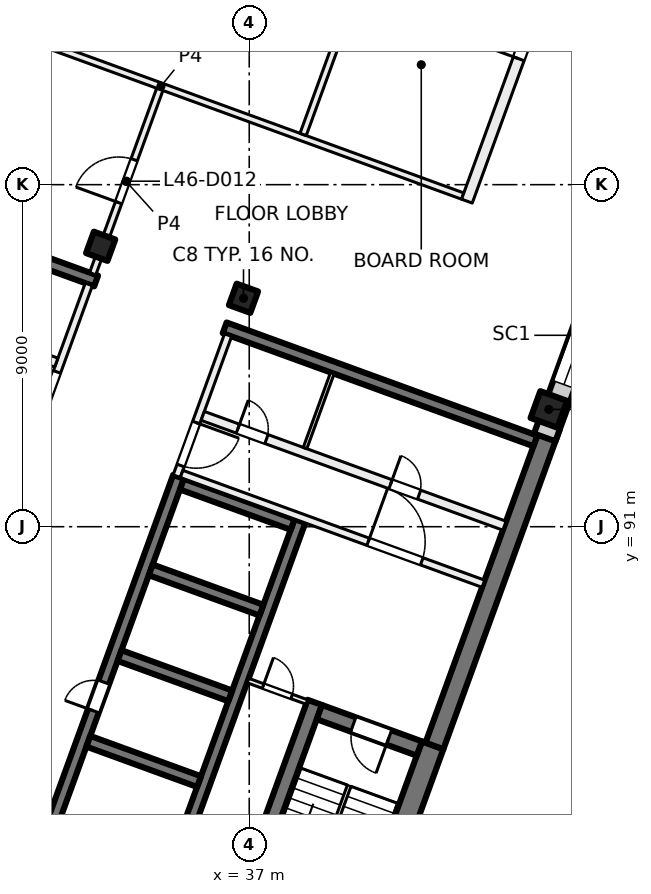
"""IFC4 building model, lengths in metres.
Left out: names, types, materials, properties, quantities, classifications, styles, units other than length and angle.
Written with IfcOpenShell. Run it as: python <this file> out.ifc"""

import sys

from ifc_helpers import new_model, si_unit, direction, frame, frame_2d, origin, origin_2d, place, context, subcontext, project, spatial, rectangle, extrude, element, fill, save


model = new_model("IFC4")
c1 = context("Model", 3, precision=1e-05, world=origin(), true_north=direction((0.0, 1.0)))
c2 = subcontext(c1, "Body", "Model", "MODEL_VIEW")
j1 = project(units=[si_unit("LENGTHUNIT", "METRE"), si_unit("PLANEANGLEUNIT", "RADIAN")], contexts=[c1])
p1 = place(None, origin())
s1 = spatial("IfcSite", under=j1, at=p1, CompositionType="ELEMENT")
p2 = place(p1, origin())
s2 = spatial("IfcBuilding", under=s1, at=p2, CompositionType="ELEMENT")
p3 = place(p2, frame((0.0, 0.0, 196.0)))
s3 = spatial("IfcBuildingStorey", under=s2, at=p3, CompositionType="ELEMENT", Elevation=196.0)
for number, where, z_axis, x_axis in (
    (1, (36.849, 97.011, 0.0), (0.0, 0.0, 1.0), (-0.342, -0.94, 0.0)),
    (2, (33.091, 98.379, 0.0), (0.0, 0.0, 1.0), (-0.342, -0.94, 0.0)),
):
    element("IfcColumn", number, at=place(p3, frame(where, z_axis=z_axis, x_axis=x_axis)), inside=s3, PredefinedType="COLUMN", context=c2, shape_type="SweptSolid", body=[
        extrude(rectangle(XDim=0.6, YDim=0.6, at=origin_2d()), origin(), (0.0, 0.0, 1.0), 4.0),
    ])
p4 = place(p3, frame((44.884, 94.087, 0.0), z_axis=(0.0, 0.0, 1.0), x_axis=(-0.342020143326, -0.939692620786, 0.0)))
e3 = element("IfcColumn", 3, at=p4, inside=s3, PredefinedType="COLUMN", context=c2, shape_type="SweptSolid", body=[
    extrude(rectangle(XDim=0.75, YDim=0.75, at=origin_2d()), origin(), (0.0, 0.0, 1.0), 4.0),
])
p5 = place(p3, frame((35.75, 78.788, 0.0), z_axis=(0.0, 0.0, 1.0), x_axis=(-0.939692894512, 0.342019391267, 0.0)))
e4 = element("IfcWall", 4, at=p5, inside=s3, PredefinedType="SHEAR", context=c2, shape_type="SweptSolid", body=[
    extrude(rectangle(XDim=14.4, YDim=0.5, at=frame_2d((7.2, 0.0))), origin(), (0.0, 0.0, 1.0), 4.0),
])
p6 = place(p3, frame((39.159, 77.92, 0.0), z_axis=(0.0, 0.0, 1.0), x_axis=(0.342016982193, 0.939693771338, 0.0)))
e5 = element("IfcWall", 5, at=p6, inside=s3, PredefinedType="SHEAR", context=c2, shape_type="SweptSolid", body=[
    extrude(rectangle(XDim=7.8, YDim=0.6, at=frame_2d((3.9, 0.0))), origin(), (0.0, 0.0, 1.0), 4.0),
])
p7 = place(p3, frame((41.874, 85.232, 0.0), z_axis=(0.0, 0.0, 1.0), x_axis=(0.342020437038, 0.939692513883, 0.0)))
e6 = element("IfcWall", 6, at=p7, inside=s3, PredefinedType="SHEAR", context=c2, shape_type="SweptSolid", body=[
    extrude(rectangle(XDim=8.975, YDim=0.5, at=frame_2d((4.487, 0.0))), origin(), (0.0, 0.0, 1.0), 4.0),
])
p8 = place(p3, frame((36.058, 79.048, 0.0), z_axis=(0.0, 0.0, 1.0), x_axis=(0.342016982193, 0.939693771338, 0.0)))
e7 = element("IfcWall", 7, at=p8, inside=s3, PredefinedType="SHEAR", context=c2, shape_type="SweptSolid", body=[
    extrude(rectangle(XDim=7.8, YDim=0.4, at=frame_2d((3.9, 0.0))), origin(), (0.0, 0.0, 1.0), 4.0),
])
p9 = place(p3, frame((41.476, 85.164, 0.0), z_axis=(0.0, 0.0, 1.0), x_axis=(-0.939678810556, 0.342058084236, 0.0)))
e8 = element("IfcWall", 8, at=p9, inside=s3, PredefinedType="SHEAR", context=c2, shape_type="SweptSolid", body=[
    extrude(rectangle(XDim=2.8, YDim=0.4, at=frame_2d((1.4, 0.0))), origin(), (0.0, 0.0, 1.0), 4.0),
])
p10 = place(p9, frame((0.85, 0.0, 0.0)))
e9 = element("IfcOpeningElement", 9, at=p10, cuts=e8, PredefinedType="OPENING", context=c2, shape_type="SweptSolid", body=[
    extrude(rectangle(XDim=1.0, YDim=2.1, at=frame_2d((0.5, 1.05))), frame((0.0, 0.21, 0.0), z_axis=(0.0, -1.0, 0.0), x_axis=(1.0, 0.0, 0.0)), (0.0, 0.0, 1.0), 0.42),
])
p11 = place(p3, frame((30.949, 80.801, 0.0), z_axis=(0.0, 0.0, 1.0), x_axis=(0.342016684409, 0.939693879721, 0.0)))
e10 = element("IfcWall", 10, at=p11, inside=s3, PredefinedType="SHEAR", context=c2, shape_type="SweptSolid", body=[
    extrude(rectangle(XDim=12.25, YDim=0.3, at=frame_2d((6.125, 0.0))), origin(), (0.0, 0.0, 1.0), 4.0),
])
p12 = place(p11, frame((0.9, 0.0, 0.0)))
e11 = element("IfcOpeningElement", 11, at=p12, cuts=e10, PredefinedType="OPENING", context=c2, shape_type="SweptSolid", body=[
    extrude(rectangle(XDim=0.8, YDim=2.1, at=frame_2d((0.4, 1.05))), frame((0.0, 0.16, 0.0), z_axis=(0.0, -1.0, 0.0), x_axis=(1.0, 0.0, 0.0)), (0.0, 0.0, 1.0), 0.32),
])
p13 = place(p11, frame((5.7, 0.0, 0.0)))
e12 = element("IfcOpeningElement", 12, at=p13, cuts=e10, PredefinedType="OPENING", context=c2, shape_type="SweptSolid", body=[
    extrude(rectangle(XDim=0.8, YDim=2.1, at=frame_2d((0.4, 1.05))), frame((0.0, 0.16, 0.0), z_axis=(0.0, -1.0, 0.0), x_axis=(1.0, 0.0, 0.0)), (0.0, 0.0, 1.0), 0.32),
])
p14 = place(p3, frame((34.144, 79.638, 0.0), z_axis=(0.0, 0.0, 1.0), x_axis=(0.342016684409, 0.939693879721, 0.0)))
e13 = element("IfcWall", 13, at=p14, inside=s3, PredefinedType="SHEAR", context=c2, shape_type="SweptSolid", body=[
    extrude(rectangle(XDim=12.25, YDim=0.3, at=frame_2d((6.125, 0.0))), origin(), (0.0, 0.0, 1.0), 4.0),
])
p15 = place(p3, frame((35.679, 84.294, 0.0), z_axis=(0.0, 0.0, 1.0), x_axis=(-0.939706007505, 0.341983361377, 0.0)))
e14 = element("IfcWall", 14, at=p15, inside=s3, PredefinedType="SHEAR", context=c2, shape_type="SweptSolid", body=[
    extrude(rectangle(XDim=3.1, YDim=0.3, at=frame_2d((1.55, 0.0))), origin(), (0.0, 0.0, 1.0), 4.0),
])
for number, where, z_axis, x_axis in (
    (15, (36.5, 86.549, 0.0), (0.0, 0.0, 1.0), (-0.94, 0.342, 0.0)),
    (16, (37.321, 88.805, 0.0), (0.0, 0.0, 1.0), (-0.94, 0.342, 0.0)),
    (17, (38.142, 91.06, 0.0), (0.0, 0.0, 1.0), (-0.94, 0.342, 0.0)),
):
    element("IfcWall", number, at=place(p3, frame(where, z_axis=z_axis, x_axis=x_axis)), inside=s3, PredefinedType="SHEAR", context=c2, shape_type="SweptSolid", body=[
        extrude(rectangle(XDim=3.1, YDim=0.3, at=frame_2d((1.55, 0.0))), origin(), (0.0, 0.0, 1.0), 4.0),
    ])
p16 = place(p3, frame((44.529, 93.258, 0.0), z_axis=(0.0, 0.0, 1.0), x_axis=(-0.9396917844, 0.342022441267, 0.0)))
e18 = element("IfcWall", 18, at=p16, inside=s3, PredefinedType="SHEAR", context=c2, shape_type="SweptSolid", body=[
    extrude(rectangle(XDim=8.7, YDim=0.3, at=frame_2d((4.35, 0.0))), origin(), (0.0, 0.0, 1.0), 4.0),
])
p17 = place(p3, frame((32.971, 97.465, 0.0), z_axis=(0.0, 0.0, 1.0), x_axis=(-0.939695066972, 0.34201342241, 0.0)))
e19 = element("IfcWall", 19, at=p17, inside=s3, PredefinedType="SHEAR", context=c2, shape_type="SweptSolid", body=[
    extrude(rectangle(XDim=8.7, YDim=0.3, at=frame_2d((4.35, 0.0))), origin(), (0.0, 0.0, 1.0), 4.0),
])
p18 = place(p3, frame((52.212, 113.783, 0.0), z_axis=(0.0, 0.0, 1.0), x_axis=(-0.34202521188, -0.939690775968, 0.0)))
e20 = element("IfcWall", 20, at=p18, inside=s3, PredefinedType="SOLIDWALL", context=c2, shape_type="SweptSolid", body=[
    extrude(rectangle(XDim=21.745, YDim=0.6, at=frame_2d((10.873, 0.0))), origin(), (0.0, 0.0, 1.0), 3.625),
])
p19 = place(p18, frame((3.765, 0.0, 0.9)))
e21 = element("IfcOpeningElement", 21, at=p19, cuts=e20, PredefinedType="OPENING", context=c2, shape_type="SweptSolid", body=[
    extrude(rectangle(XDim=3.0, YDim=2.4, at=frame_2d((1.5, 1.2))), frame((0.0, 0.31, 0.0), z_axis=(0.0, -1.0, 0.0), x_axis=(1.0, 0.0, 0.0)), (0.0, 0.0, 1.0), 0.62),
])
p20 = place(p18, frame((8.265, 0.0, 0.9)))
e22 = element("IfcOpeningElement", 22, at=p20, cuts=e20, PredefinedType="OPENING", context=c2, shape_type="SweptSolid", body=[
    extrude(rectangle(XDim=3.0, YDim=2.4, at=frame_2d((1.5, 1.2))), frame((0.0, 0.31, 0.0), z_axis=(0.0, -1.0, 0.0), x_axis=(1.0, 0.0, 0.0)), (0.0, 0.0, 1.0), 0.62),
])
p21 = place(p18, frame((12.765, 0.0, 0.9)))
e23 = element("IfcOpeningElement", 23, at=p21, cuts=e20, PredefinedType="OPENING", context=c2, shape_type="SweptSolid", body=[
    extrude(rectangle(XDim=3.0, YDim=2.4, at=frame_2d((1.5, 1.2))), frame((0.0, 0.31, 0.0), z_axis=(0.0, -1.0, 0.0), x_axis=(1.0, 0.0, 0.0)), (0.0, 0.0, 1.0), 0.62),
])
p22 = place(p18, frame((17.265, 0.0, 0.9)))
e24 = element("IfcOpeningElement", 24, at=p22, cuts=e20, PredefinedType="OPENING", context=c2, shape_type="SweptSolid", body=[
    extrude(rectangle(XDim=3.0, YDim=2.4, at=frame_2d((1.5, 1.2))), frame((0.0, 0.31, 0.0), z_axis=(0.0, -1.0, 0.0), x_axis=(1.0, 0.0, 0.0)), (0.0, 0.0, 1.0), 0.62),
])
p23 = place(p3, frame((24.666, 100.669, 0.0), z_axis=(0.0, 0.0, 1.0), x_axis=(0.34201964167, 0.939692803373, 0.0)))
e25 = element("IfcWall", 25, at=p23, inside=s3, PredefinedType="SOLIDWALL", context=c2, shape_type="SweptSolid", body=[
    extrude(rectangle(XDim=32.884, YDim=0.6, at=frame_2d((16.442, 0.0))), origin(), (0.0, 0.0, 1.0), 3.625),
])
p24 = place(p23, frame((1.48, 0.0, 0.9)))
e26 = element("IfcOpeningElement", 26, at=p24, cuts=e25, PredefinedType="OPENING", context=c2, shape_type="SweptSolid", body=[
    extrude(rectangle(XDim=3.0, YDim=2.4, at=frame_2d((1.5, 1.2))), frame((0.0, 0.31, 0.0), z_axis=(0.0, -1.0, 0.0), x_axis=(1.0, 0.0, 0.0)), (0.0, 0.0, 1.0), 0.62),
])
p25 = place(p23, frame((5.98, 0.0, 0.9)))
e27 = element("IfcOpeningElement", 27, at=p25, cuts=e25, PredefinedType="OPENING", context=c2, shape_type="SweptSolid", body=[
    extrude(rectangle(XDim=3.0, YDim=2.4, at=frame_2d((1.5, 1.2))), frame((0.0, 0.31, 0.0), z_axis=(0.0, -1.0, 0.0), x_axis=(1.0, 0.0, 0.0)), (0.0, 0.0, 1.0), 0.62),
])
p26 = place(p23, frame((10.48, 0.0, 0.9)))
e28 = element("IfcOpeningElement", 28, at=p26, cuts=e25, PredefinedType="OPENING", context=c2, shape_type="SweptSolid", body=[
    extrude(rectangle(XDim=3.0, YDim=2.4, at=frame_2d((1.5, 1.2))), frame((0.0, 0.31, 0.0), z_axis=(0.0, -1.0, 0.0), x_axis=(1.0, 0.0, 0.0)), (0.0, 0.0, 1.0), 0.62),
])
p27 = place(p23, frame((14.98, 0.0, 0.9)))
e29 = element("IfcOpeningElement", 29, at=p27, cuts=e25, PredefinedType="OPENING", context=c2, shape_type="SweptSolid", body=[
    extrude(rectangle(XDim=3.0, YDim=2.4, at=frame_2d((1.5, 1.2))), frame((0.0, 0.31, 0.0), z_axis=(0.0, -1.0, 0.0), x_axis=(1.0, 0.0, 0.0)), (0.0, 0.0, 1.0), 0.62),
])
p28 = place(p23, frame((19.48, 0.0, 0.9)))
e30 = element("IfcOpeningElement", 30, at=p28, cuts=e25, PredefinedType="OPENING", context=c2, shape_type="SweptSolid", body=[
    extrude(rectangle(XDim=3.0, YDim=2.4, at=frame_2d((1.5, 1.2))), frame((0.0, 0.31, 0.0), z_axis=(0.0, -1.0, 0.0), x_axis=(1.0, 0.0, 0.0)), (0.0, 0.0, 1.0), 0.62),
])
p29 = place(p23, frame((23.98, 0.0, 0.9)))
e31 = element("IfcOpeningElement", 31, at=p29, cuts=e25, PredefinedType="OPENING", context=c2, shape_type="SweptSolid", body=[
    extrude(rectangle(XDim=3.0, YDim=2.4, at=frame_2d((1.5, 1.2))), frame((0.0, 0.31, 0.0), z_axis=(0.0, -1.0, 0.0), x_axis=(1.0, 0.0, 0.0)), (0.0, 0.0, 1.0), 0.62),
])
p30 = place(p23, frame((28.48, 0.0, 0.9)))
e32 = element("IfcOpeningElement", 32, at=p30, cuts=e25, PredefinedType="OPENING", context=c2, shape_type="SweptSolid", body=[
    extrude(rectangle(XDim=3.0, YDim=2.4, at=frame_2d((1.5, 1.2))), frame((0.0, 0.31, 0.0), z_axis=(0.0, -1.0, 0.0), x_axis=(1.0, 0.0, 0.0)), (0.0, 0.0, 1.0), 0.62),
])
p31 = place(p3, frame((31.427, 93.663, 0.0), z_axis=(0.0, 0.0, 1.0), x_axis=(0.342030870568, 0.93968871632, 0.0)))
e33 = element("IfcWall", 33, at=p31, inside=s3, PredefinedType="PARTITIONING", context=c2, shape_type="SweptSolid", body=[
    extrude(rectangle(XDim=3.95, YDim=0.2, at=frame_2d((1.975, 0.0))), origin(), (0.0, 0.0, 1.0), 3.625),
])
p32 = place(p31, frame((0.3, 0.0, 0.0)))
e34 = element("IfcOpeningElement", 34, at=p32, cuts=e33, PredefinedType="OPENING", context=c2, shape_type="SweptSolid", body=[
    extrude(rectangle(XDim=1.2, YDim=2.1, at=frame_2d((0.6, 1.05))), frame((0.0, 0.11, 0.0), z_axis=(0.0, -1.0, 0.0), x_axis=(1.0, 0.0, 0.0)), (0.0, 0.0, 1.0), 0.22),
])
p33 = place(p3, frame((23.983, 98.208, 0.0), z_axis=(0.0, 0.0, 1.0), x_axis=(0.939699751196, -0.342000552051, 0.0)))
e35 = element("IfcWall", 35, at=p33, inside=s3, PredefinedType="PARTITIONING", context=c2, shape_type="SweptSolid", body=[
    extrude(rectangle(XDim=8.45, YDim=0.25, at=frame_2d((4.225, 0.0))), origin(), (0.0, 0.0, 1.0), 3.625),
])
p34 = place(p33, frame((3.825, 0.0, 0.0)))
e36 = element("IfcOpeningElement", 36, at=p34, cuts=e35, PredefinedType="OPENING", context=c2, shape_type="SweptSolid", body=[
    extrude(rectangle(XDim=0.8, YDim=2.1, at=frame_2d((0.4, 1.05))), frame((0.0, 0.135, 0.0), z_axis=(0.0, -1.0, 0.0), x_axis=(1.0, 0.0, 0.0)), (0.0, 0.0, 1.0), 0.27),
])
p35 = place(p3, frame((36.443, 96.041, 0.0), z_axis=(0.0, 0.0, 1.0), x_axis=(-0.341996156931, -0.939701350773, 0.0)))
e37 = element("IfcWall", 37, at=p35, inside=s3, PredefinedType="PARTITIONING", context=c2, shape_type="SweptSolid", body=[
    extrude(rectangle(XDim=3.95, YDim=0.2, at=frame_2d((1.975, 0.0))), origin(), (0.0, 0.0, 1.0), 3.625),
])
p36 = place(p35, frame((2.45, 0.0, 0.0)))
e38 = element("IfcOpeningElement", 38, at=p36, cuts=e37, PredefinedType="OPENING", context=c2, shape_type="SweptSolid", body=[
    extrude(rectangle(XDim=1.2, YDim=2.1, at=frame_2d((0.6, 1.05))), frame((0.0, 0.11, 0.0), z_axis=(0.0, -1.0, 0.0), x_axis=(1.0, 0.0, 0.0)), (0.0, 0.0, 1.0), 0.22),
])
p37 = place(p3, frame((35.22, 92.389, 0.0), z_axis=(0.0, 0.0, 1.0), x_axis=(0.939690465531, -0.342026064782, 0.0)))
e39 = element("IfcWall", 39, at=p37, inside=s3, PredefinedType="PARTITIONING", context=c2, shape_type="SweptSolid", body=[
    extrude(rectangle(XDim=8.45, YDim=0.2, at=frame_2d((4.225, 0.0))), origin(), (0.0, 0.0, 1.0), 3.625),
])
p38 = place(p37, frame((5.225, 0.0, 0.0)))
e40 = element("IfcOpeningElement", 40, at=p38, cuts=e39, PredefinedType="OPENING", context=c2, shape_type="SweptSolid", body=[
    extrude(rectangle(XDim=1.5, YDim=2.1, at=frame_2d((0.75, 1.05))), frame((0.0, 0.11, 0.0), z_axis=(0.0, -1.0, 0.0), x_axis=(1.0, 0.0, 0.0)), (0.0, 0.0, 1.0), 0.22),
])
p39 = place(p3, frame((35.776, 93.916, 0.0), z_axis=(0.0, 0.0, 1.0), x_axis=(0.939690465531, -0.342026064782, 0.0)))
e41 = element("IfcWall", 41, at=p39, inside=s3, PredefinedType="PARTITIONING", context=c2, shape_type="SweptSolid", body=[
    extrude(rectangle(XDim=8.45, YDim=0.25, at=frame_2d((4.225, 0.0))), origin(), (0.0, 0.0, 1.0), 3.625),
])
p40 = place(p39, frame((0.985, 0.0, 0.0)))
e42 = element("IfcOpeningElement", 42, at=p40, cuts=e41, PredefinedType="OPENING", context=c2, shape_type="SweptSolid", body=[
    extrude(rectangle(XDim=0.8, YDim=2.1, at=frame_2d((0.4, 1.05))), frame((0.0, 0.135, 0.0), z_axis=(0.0, -1.0, 0.0), x_axis=(1.0, 0.0, 0.0)), (0.0, 0.0, 1.0), 0.27),
])
p41 = place(p39, frame((5.26, 0.0, 0.0)))
e43 = element("IfcOpeningElement", 43, at=p41, cuts=e41, PredefinedType="OPENING", context=c2, shape_type="SweptSolid", body=[
    extrude(rectangle(XDim=0.8, YDim=2.1, at=frame_2d((0.4, 1.05))), frame((0.0, 0.135, 0.0), z_axis=(0.0, -1.0, 0.0), x_axis=(1.0, 0.0, 0.0)), (0.0, 0.0, 1.0), 0.27),
])
p42 = place(p3, frame((36.966, 86.952, 0.0), z_axis=(0.0, 0.0, 1.0), x_axis=(0.939672407396, -0.342075674051, 0.0)))
e44 = element("IfcWall", 44, at=p42, inside=s3, PredefinedType="PARTITIONING", context=c2, shape_type="SweptSolid", body=[
    extrude(rectangle(XDim=1.65, YDim=0.125, at=frame_2d((0.825, 0.0))), origin(), (0.0, 0.0, 1.0), 3.625),
])
p43 = place(p42, frame((0.425, 0.0, 0.0)))
e45 = element("IfcOpeningElement", 45, at=p43, cuts=e44, PredefinedType="OPENING", context=c2, shape_type="SweptSolid", body=[
    extrude(rectangle(XDim=0.8, YDim=2.1, at=frame_2d((0.4, 1.05))), frame((0.0, 0.073, 0.0), z_axis=(0.0, -1.0, 0.0), x_axis=(1.0, 0.0, 0.0)), (0.0, 0.0, 1.0), 0.145),
])
p44 = place(p3, frame((39.187, 95.042, 0.0), z_axis=(0.0, 0.0, 1.0), x_axis=(-0.342023078919, -0.939691552312, 0.0)))
e46 = element("IfcWall", 46, at=p44, inside=s3, PredefinedType="PARTITIONING", context=c2, shape_type="SweptSolid", body=[
    extrude(rectangle(XDim=2.1, YDim=0.1, at=frame_2d((1.05, 0.0))), origin(), (0.0, 0.0, 1.0), 3.625),
])
p45 = place(p3, frame((26.736, 105.48, 0.0), z_axis=(0.0, 0.0, 1.0), x_axis=(0.939695108427, -0.342013308511, 0.0)))
e47 = element("IfcWall", 47, at=p45, inside=s3, PredefinedType="PARTITIONING", context=c2, shape_type="SweptSolid", body=[
    extrude(rectangle(XDim=16.9, YDim=0.175, at=frame_2d((8.45, 0.0))), origin(), (0.0, 0.0, 1.0), 3.625),
])
p46 = place(p3, frame((32.881, 97.657, 0.0), z_axis=(0.0, 0.0, 1.0), x_axis=(0.342058204353, 0.939678766832, 0.0)))
e48 = element("IfcWall", 48, at=p46, inside=s3, PredefinedType="PARTITIONING", context=c2, shape_type="SweptSolid", body=[
    extrude(rectangle(XDim=5.163, YDim=0.175, at=frame_2d((2.581, 0.0))), origin(), (0.0, 0.0, 1.0), 3.625),
])
p47 = place(p46, frame((1.991, 0.0, 0.0)))
e49 = element("IfcOpeningElement", 49, at=p47, cuts=e48, PredefinedType="OPENING", context=c2, shape_type="SweptSolid", body=[
    extrude(rectangle(XDim=1.2, YDim=2.1, at=frame_2d((0.6, 1.05))), frame((0.0, 0.097, 0.0), z_axis=(0.0, -1.0, 0.0), x_axis=(1.0, 0.0, 0.0)), (0.0, 0.0, 1.0), 0.195),
])
p48 = place(p3, frame((38.418, 101.321, 0.0), z_axis=(0.0, 0.0, 1.0), x_axis=(0.342082778631, 0.939669821035, 0.0)))
e50 = element("IfcWall", 50, at=p48, inside=s3, PredefinedType="PARTITIONING", context=c2, shape_type="SweptSolid", body=[
    extrude(rectangle(XDim=9.001, YDim=0.175, at=frame_2d((4.5, 0.0))), origin(), (0.0, 0.0, 1.0), 3.625),
])
p49 = place(p3, frame((42.728, 99.567, 0.0), z_axis=(0.0, 0.0, 1.0), x_axis=(0.342015412648, 0.939694342598, 0.0)))
e51 = element("IfcWall", 51, at=p49, inside=s3, PredefinedType="PARTITIONING", context=c2, shape_type="SweptSolid", body=[
    extrude(rectangle(XDim=23.031, YDim=0.3, at=frame_2d((11.516, 0.0))), origin(), (0.0, 0.0, 1.0), 3.625),
])
p50 = place(p49, frame((3.987, 0.0, 0.0)))
e52 = element("IfcOpeningElement", 52, at=p50, cuts=e51, PredefinedType="OPENING", context=c2, shape_type="SweptSolid", body=[
    extrude(rectangle(XDim=1.2, YDim=2.1, at=frame_2d((0.6, 1.05))), frame((0.0, 0.16, 0.0), z_axis=(0.0, -1.0, 0.0), x_axis=(1.0, 0.0, 0.0)), (0.0, 0.0, 1.0), 0.32),
])
p51 = place(p49, frame((10.437, 0.0, 0.0)))
e53 = element("IfcOpeningElement", 53, at=p51, cuts=e51, PredefinedType="OPENING", context=c2, shape_type="SweptSolid", body=[
    extrude(rectangle(XDim=1.8, YDim=2.1, at=frame_2d((0.9, 1.05))), frame((0.0, 0.16, 0.0), z_axis=(0.0, -1.0, 0.0), x_axis=(1.0, 0.0, 0.0)), (0.0, 0.0, 1.0), 0.32),
])
p52 = place(p49, frame((14.687, 0.0, 0.0)))
e54 = element("IfcOpeningElement", 54, at=p52, cuts=e51, PredefinedType="OPENING", context=c2, shape_type="SweptSolid", body=[
    extrude(rectangle(XDim=0.8, YDim=2.1, at=frame_2d((0.4, 1.05))), frame((0.0, 0.16, 0.0), z_axis=(0.0, -1.0, 0.0), x_axis=(1.0, 0.0, 0.0)), (0.0, 0.0, 1.0), 0.32),
])
p53 = place(p22, origin())
e55 = element("IfcWindow", 55, at=p53, inside=s3, PartitioningType="SINGLE_PANEL", PredefinedType="WINDOW", context=c2, shape_type="SweptSolid", body=[
    extrude(rectangle(XDim=3.0, YDim=2.4, at=frame_2d((1.5, 1.2))), frame((0.0, 0.03, 0.0), z_axis=(0.0, -1.0, 0.0), x_axis=(1.0, 0.0, 0.0)), (0.0, 0.0, 1.0), 0.06),
])
fill(e24, e55)
p54 = place(p13, origin())
e56 = element("IfcDoor", 56, at=p54, inside=s3, OperationType="SINGLE_SWING_RIGHT", PredefinedType="DOOR", context=c2, shape_type="SweptSolid", body=[
    extrude(rectangle(XDim=0.8, YDim=2.1, at=frame_2d((0.4, 1.05))), frame((0.0, 0.025, 0.0), z_axis=(0.0, -1.0, 0.0), x_axis=(1.0, 0.0, 0.0)), (0.0, 0.0, 1.0), 0.05),
])
fill(e12, e56)
p55 = place(p32, origin())
e57 = element("IfcDoor", 57, at=p55, inside=s3, OperationType="DOUBLE_DOOR_SINGLE_SWING", PredefinedType="DOOR", context=c2, shape_type="SweptSolid", body=[
    extrude(rectangle(XDim=1.2, YDim=2.1, at=frame_2d((0.6, 1.05))), frame((0.0, 0.025, 0.0), z_axis=(0.0, -1.0, 0.0), x_axis=(1.0, 0.0, 0.0)), (0.0, 0.0, 1.0), 0.05),
])
fill(e34, e57)
p56 = place(p36, origin())
e58 = element("IfcDoor", 58, at=p56, inside=s3, OperationType="DOUBLE_DOOR_SINGLE_SWING", PredefinedType="DOOR", context=c2, shape_type="SweptSolid", body=[
    extrude(rectangle(XDim=1.2, YDim=2.1, at=frame_2d((0.6, 1.05))), frame((0.0, 0.025, 0.0), z_axis=(0.0, -1.0, 0.0), x_axis=(1.0, 0.0, 0.0)), (0.0, 0.0, 1.0), 0.05),
])
fill(e38, e58)
p57 = place(p38, origin())
e59 = element("IfcDoor", 59, at=p57, inside=s3, OperationType="DOUBLE_DOOR_SINGLE_SWING", PredefinedType="DOOR", context=c2, shape_type="SweptSolid", body=[
    extrude(rectangle(XDim=1.5, YDim=2.1, at=frame_2d((0.75, 1.05))), frame((0.0, 0.025, 0.0), z_axis=(0.0, -1.0, 0.0), x_axis=(1.0, 0.0, 0.0)), (0.0, 0.0, 1.0), 0.05),
])
fill(e40, e59)
p58 = place(p10, origin())
e60 = element("IfcDoor", 60, at=p58, inside=s3, OperationType="SINGLE_SWING_RIGHT", PredefinedType="DOOR", context=c2, shape_type="SweptSolid", body=[
    extrude(rectangle(XDim=1.0, YDim=2.1, at=frame_2d((0.5, 1.05))), frame((0.0, 0.025, 0.0), z_axis=(0.0, -1.0, 0.0), x_axis=(1.0, 0.0, 0.0)), (0.0, 0.0, 1.0), 0.05),
])
fill(e9, e60)
p59 = place(p43, origin())
e61 = element("IfcDoor", 61, at=p59, inside=s3, OperationType="SINGLE_SWING_LEFT", PredefinedType="DOOR", context=c2, shape_type="SweptSolid", body=[
    extrude(rectangle(XDim=0.8, YDim=2.1, at=frame_2d((0.4, 1.05))), frame((0.0, 0.025, 0.0), z_axis=(0.0, -1.0, 0.0), x_axis=(1.0, 0.0, 0.0)), (0.0, 0.0, 1.0), 0.05),
])
fill(e45, e61)
p60 = place(p40, origin())
e62 = element("IfcDoor", 62, at=p60, inside=s3, OperationType="SINGLE_SWING_RIGHT", PredefinedType="DOOR", context=c2, shape_type="SweptSolid", body=[
    extrude(rectangle(XDim=0.8, YDim=2.1, at=frame_2d((0.4, 1.05))), frame((0.0, 0.025, 0.0), z_axis=(0.0, -1.0, 0.0), x_axis=(1.0, 0.0, 0.0)), (0.0, 0.0, 1.0), 0.05),
])
fill(e42, e62)
p61 = place(p41, origin())
e63 = element("IfcDoor", 63, at=p61, inside=s3, OperationType="SINGLE_SWING_LEFT", PredefinedType="DOOR", context=c2, shape_type="SweptSolid", body=[
    extrude(rectangle(XDim=0.8, YDim=2.1, at=frame_2d((0.4, 1.05))), frame((0.0, 0.025, 0.0), z_axis=(0.0, -1.0, 0.0), x_axis=(1.0, 0.0, 0.0)), (0.0, 0.0, 1.0), 0.05),
])
fill(e43, e63)
p62 = place(p47, origin())
e64 = element("IfcDoor", 64, at=p62, inside=s3, OperationType="DOUBLE_DOOR_SINGLE_SWING", PredefinedType="DOOR", context=c2, shape_type="SweptSolid", body=[
    extrude(rectangle(XDim=1.2, YDim=2.1, at=frame_2d((0.6, 1.05))), frame((0.0, 0.025, 0.0), z_axis=(0.0, -1.0, 0.0), x_axis=(1.0, 0.0, 0.0)), (0.0, 0.0, 1.0), 0.05),
])
fill(e49, e64)
p63 = place(p50, origin())
e65 = element("IfcDoor", 65, at=p63, inside=s3, OperationType="DOUBLE_DOOR_SINGLE_SWING", PredefinedType="DOOR", context=c2, shape_type="SweptSolid", body=[
    extrude(rectangle(XDim=1.2, YDim=2.1, at=frame_2d((0.6, 1.05))), frame((0.0, 0.025, 0.0), z_axis=(0.0, -1.0, 0.0), x_axis=(1.0, 0.0, 0.0)), (0.0, 0.0, 1.0), 0.05),
])
fill(e52, e65)
save(model, sys.argv[1])
